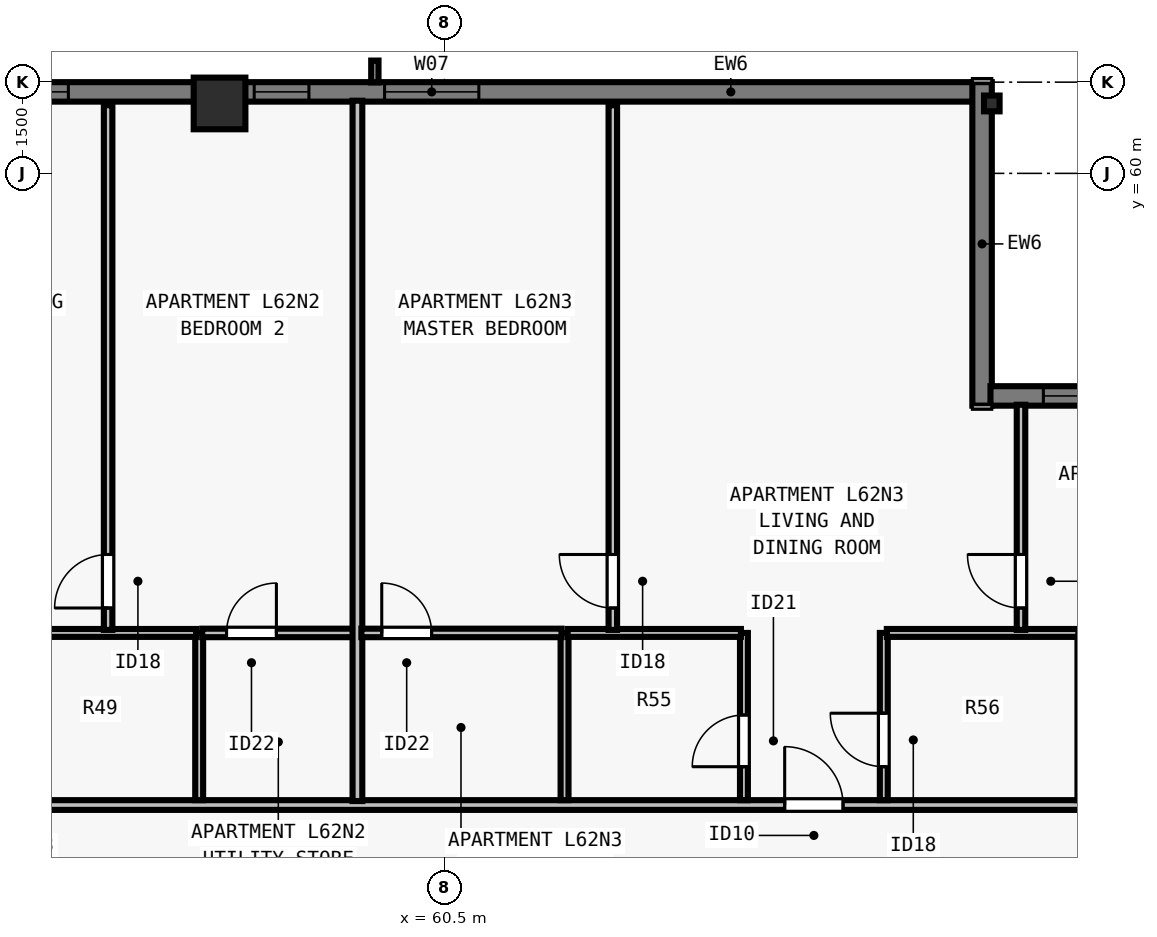
"""IFC4 building model, lengths in metres.
Left out: names, types, materials, properties, quantities, classifications, styles, units other than length and angle.
Written with IfcOpenShell. Run it as: python <this file> out.ifc"""

import sys

from ifc_helpers import new_model, si_unit, direction, frame, frame_2d, origin, origin_2d, place, context, subcontext, project, spatial, rectangle, i_section, extrude, element, fill, save


model = new_model("IFC4")
c1 = context("Model", 3, precision=1e-05, world=origin(), true_north=direction((0.0, 1.0)))
c2 = subcontext(c1, "Body", "Model", "MODEL_VIEW")
j1 = project(units=[si_unit("LENGTHUNIT", "METRE"), si_unit("PLANEANGLEUNIT", "RADIAN")], contexts=[c1])
p1 = place(None, origin())
s1 = spatial("IfcSite", under=j1, at=p1, CompositionType="ELEMENT")
p2 = place(p1, origin())
s2 = spatial("IfcBuilding", under=s1, at=p2, CompositionType="ELEMENT")
p3 = place(p2, frame((0.0, 0.0, 227.0)))
s3 = spatial("IfcBuildingStorey", under=s2, at=p3, CompositionType="ELEMENT", Elevation=227.0)
p4 = place(p3, frame((69.5, 61.15, 0.0), z_axis=(0.0, 0.0, 1.0), x_axis=(1.0, 0.0, 0.0)))
e1 = element("IfcColumn", 1, at=p4, inside=s3, PredefinedType="COLUMN", context=c2, shape_type="SweptSolid", body=[
    extrude(i_section(OverallWidth=0.256, OverallDepth=0.26, WebThickness=0.01, FlangeThickness=0.017, FilletRadius=0.013, at=origin_2d()), origin(), (0.0, 0.0, 1.0), 3.5),
])
p5 = place(p3, frame((56.8, 61.15, 0.0), z_axis=(0.0, 0.0, 1.0), x_axis=(1.0, 0.0, 0.0)))
e2 = element("IfcColumn", 2, at=p5, inside=s3, PredefinedType="COLUMN", context=c2, shape_type="SweptSolid", body=[
    extrude(rectangle(XDim=0.85, YDim=0.85, at=origin_2d()), origin(), (0.0, 0.0, 1.0), 3.5),
])
p6 = place(p3, frame((34.5, 61.34, 0.0), z_axis=(0.0, 0.0, 1.0), x_axis=(1.0, 0.0, 0.0)))
e3 = element("IfcWall", 3, at=p6, inside=s3, PredefinedType="SOLIDWALL", context=c2, shape_type="SweptSolid", body=[
    extrude(rectangle(XDim=34.702, YDim=0.32, at=frame_2d((17.351, 0.0))), origin(), (0.0, 0.0, 1.0), 3.29),
])
p7 = place(p6, frame((4.312, 0.0, 0.8)))
e4 = element("IfcOpeningElement", 4, at=p7, cuts=e3, PredefinedType="OPENING", context=c2, shape_type="SweptSolid", body=[
    extrude(rectangle(XDim=1.55, YDim=1.678, at=frame_2d((0.775, 0.839))), frame((0.0, 0.17, 0.0), z_axis=(0.0, -1.0, 0.0), x_axis=(1.0, 0.0, 0.0)), (0.0, 0.0, 1.0), 0.34),
])
p8 = place(p6, frame((7.988, 0.0, 0.8)))
e5 = element("IfcOpeningElement", 5, at=p8, cuts=e3, PredefinedType="OPENING", context=c2, shape_type="SweptSolid", body=[
    extrude(rectangle(XDim=1.85, YDim=1.678, at=frame_2d((0.925, 0.839))), frame((0.0, 0.17, 0.0), z_axis=(0.0, -1.0, 0.0), x_axis=(1.0, 0.0, 0.0)), (0.0, 0.0, 1.0), 0.34),
])
p9 = place(p6, frame((15.188, 0.0, 0.8)))
e6 = element("IfcOpeningElement", 6, at=p9, cuts=e3, PredefinedType="OPENING", context=c2, shape_type="SweptSolid", body=[
    extrude(rectangle(XDim=1.85, YDim=1.678, at=frame_2d((0.925, 0.839))), frame((0.0, 0.17, 0.0), z_axis=(0.0, -1.0, 0.0), x_axis=(1.0, 0.0, 0.0)), (0.0, 0.0, 1.0), 0.34),
])
p10 = place(p6, frame((18.264, 0.0, 0.8)))
e7 = element("IfcOpeningElement", 7, at=p10, cuts=e3, PredefinedType="OPENING", context=c2, shape_type="SweptSolid", body=[
    extrude(rectangle(XDim=1.55, YDim=1.678, at=frame_2d((0.775, 0.839))), frame((0.0, 0.17, 0.0), z_axis=(0.0, -1.0, 0.0), x_axis=(1.0, 0.0, 0.0)), (0.0, 0.0, 1.0), 0.34),
])
p11 = place(p6, frame((25.014, 0.0, 0.8)))
e8 = element("IfcOpeningElement", 8, at=p11, cuts=e3, PredefinedType="OPENING", context=c2, shape_type="SweptSolid", body=[
    extrude(rectangle(XDim=1.55, YDim=1.678, at=frame_2d((0.775, 0.839))), frame((0.0, 0.17, 0.0), z_axis=(0.0, -1.0, 0.0), x_axis=(1.0, 0.0, 0.0)), (0.0, 0.0, 1.0), 0.34),
])
p12 = place(p6, frame((10.95, 0.0, 0.8)))
e9 = element("IfcOpeningElement", 9, at=p12, cuts=e3, PredefinedType="OPENING", context=c2, shape_type="SweptSolid", body=[
    extrude(rectangle(XDim=0.9, YDim=1.678, at=frame_2d((0.45, 0.839))), frame((0.0, 0.17, 0.0), z_axis=(0.0, -1.0, 0.0), x_axis=(1.0, 0.0, 0.0)), (0.0, 0.0, 1.0), 0.34),
])
p13 = place(p6, frame((22.87, 0.0, 0.8)))
e10 = element("IfcOpeningElement", 10, at=p13, cuts=e3, PredefinedType="OPENING", context=c2, shape_type="SweptSolid", body=[
    extrude(rectangle(XDim=0.9, YDim=1.678, at=frame_2d((0.45, 0.839))), frame((0.0, 0.17, 0.0), z_axis=(0.0, -1.0, 0.0), x_axis=(1.0, 0.0, 0.0)), (0.0, 0.0, 1.0), 0.34),
])
p14 = place(p3, frame((69.34, 61.5, 0.0), z_axis=(0.0, 0.0, 1.0), x_axis=(0.0, -1.0, 0.0)))
e11 = element("IfcWall", 11, at=p14, inside=s3, PredefinedType="SOLIDWALL", context=c2, shape_type="SweptSolid", body=[
    extrude(rectangle(XDim=5.32, YDim=0.32, at=frame_2d((2.66, 0.0))), origin(), (0.0, 0.0, 1.0), 3.29),
])
p15 = place(p3, frame((69.478, 56.34, 0.0), z_axis=(0.0, 0.0, 1.0), x_axis=(1.0, 0.0, 0.0)))
e12 = element("IfcWall", 12, at=p15, inside=s3, PredefinedType="SOLIDWALL", context=c2, shape_type="SweptSolid", body=[
    extrude(rectangle(XDim=4.724, YDim=0.32, at=frame_2d((2.362, 0.0))), origin(), (0.0, 0.0, 1.0), 3.29),
])
p16 = place(p15, frame((0.87, 0.0, 0.8)))
e13 = element("IfcOpeningElement", 13, at=p16, cuts=e12, PredefinedType="OPENING", context=c2, shape_type="SweptSolid", body=[
    extrude(rectangle(XDim=0.9, YDim=1.678, at=frame_2d((0.45, 0.839))), frame((0.0, 0.17, 0.0), z_axis=(0.0, -1.0, 0.0), x_axis=(1.0, 0.0, 0.0)), (0.0, 0.0, 1.0), 0.34),
])
p17 = place(p3, frame((29.77, 49.613, 0.0), z_axis=(0.0, 0.0, 1.0), x_axis=(1.0, 0.0, 0.0)))
e14 = element("IfcWall", 14, at=p17, inside=s3, PredefinedType="PARTITIONING", context=c2, shape_type="SweptSolid", body=[
    extrude(rectangle(XDim=44.425, YDim=0.16, at=frame_2d((22.212, 0.0))), origin(), (0.0, 0.0, 1.0), 2.958),
])
p18 = place(p17, frame((7.241, 0.0, 0.0)))
e15 = element("IfcOpeningElement", 15, at=p18, cuts=e14, PredefinedType="OPENING", context=c2, shape_type="SweptSolid", body=[
    extrude(rectangle(XDim=0.96, YDim=2.18, at=frame_2d((0.48, 1.09))), frame((0.0, 0.09, 0.0), z_axis=(0.0, -1.0, 0.0), x_axis=(1.0, 0.0, 0.0)), (0.0, 0.0, 1.0), 0.18),
])
p19 = place(p17, frame((21.815, 0.0, 0.0)))
e16 = element("IfcOpeningElement", 16, at=p19, cuts=e14, PredefinedType="OPENING", context=c2, shape_type="SweptSolid", body=[
    extrude(rectangle(XDim=0.96, YDim=2.18, at=frame_2d((0.48, 1.09))), frame((0.0, 0.09, 0.0), z_axis=(0.0, -1.0, 0.0), x_axis=(1.0, 0.0, 0.0)), (0.0, 0.0, 1.0), 0.18),
])
p20 = place(p17, frame((36.324, 0.0, 0.0)))
e17 = element("IfcOpeningElement", 17, at=p20, cuts=e14, PredefinedType="OPENING", context=c2, shape_type="SweptSolid", body=[
    extrude(rectangle(XDim=0.96, YDim=2.18, at=frame_2d((0.48, 1.09))), frame((0.0, 0.09, 0.0), z_axis=(0.0, -1.0, 0.0), x_axis=(1.0, 0.0, 0.0)), (0.0, 0.0, 1.0), 0.18),
])
p21 = place(p3, frame((56.465, 49.692, 0.0), z_axis=(0.0, 0.0, 1.0), x_axis=(0.0, 1.0, 0.0)))
e18 = element("IfcWall", 18, at=p21, inside=s3, PredefinedType="PLUMBINGWALL", context=c2, shape_type="SweptSolid", body=[
    extrude(rectangle(XDim=2.75, YDim=0.13, at=frame_2d((1.375, 0.0))), origin(), (0.0, 0.0, 1.0), 3.29),
])
p22 = place(p3, frame((53.265, 52.442, 0.0), z_axis=(0.0, 0.0, 1.0), x_axis=(1.0, 0.0, 0.0)))
e19 = element("IfcWall", 19, at=p22, inside=s3, PredefinedType="PLUMBINGWALL", context=c2, shape_type="SweptSolid", body=[
    extrude(rectangle(XDim=3.15, YDim=0.13, at=frame_2d((1.575, 0.0))), origin(), (0.0, 0.0, 1.0), 3.29),
])
p23 = place(p3, frame((54.968, 52.492, 0.0), z_axis=(0.0, 0.0, 1.0), x_axis=(0.0, 1.0, 0.0)))
e20 = element("IfcWall", 20, at=p23, inside=s3, PredefinedType="PARTITIONING", context=c2, shape_type="SweptSolid", body=[
    extrude(rectangle(XDim=8.628, YDim=0.14, at=frame_2d((4.314, 0.0))), origin(), (0.0, 0.0, 1.0), 2.958),
])
p24 = place(p23, frame((0.36, 0.0, 0.0)))
e21 = element("IfcOpeningElement", 21, at=p24, cuts=e20, PredefinedType="OPENING", context=c2, shape_type="SweptSolid", body=[
    extrude(rectangle(XDim=0.88, YDim=2.1, at=frame_2d((0.44, 1.05))), frame((0.0, 0.08, 0.0), z_axis=(0.0, -1.0, 0.0), x_axis=(1.0, 0.0, 0.0)), (0.0, 0.0, 1.0), 0.16),
])
p25 = place(p3, frame((56.515, 52.442, 0.0), z_axis=(0.0, 0.0, 1.0), x_axis=(1.0, 0.0, 0.0)))
e22 = element("IfcWall", 22, at=p25, inside=s3, PredefinedType="PARTITIONING", context=c2, shape_type="SweptSolid", body=[
    extrude(rectangle(XDim=2.603, YDim=0.14, at=frame_2d((1.301, 0.0))), origin(), (0.0, 0.0, 1.0), 3.29),
])
p26 = place(p25, frame((0.4, 0.0, 0.0)))
e23 = element("IfcOpeningElement", 23, at=p26, cuts=e22, PredefinedType="OPENING", context=c2, shape_type="SweptSolid", body=[
    extrude(rectangle(XDim=0.82, YDim=2.1, at=frame_2d((0.41, 1.05))), frame((0.0, 0.08, 0.0), z_axis=(0.0, -1.0, 0.0), x_axis=(1.0, 0.0, 0.0)), (0.0, 0.0, 1.0), 0.16),
])
p27 = place(p3, frame((59.067, 49.677, 0.0), z_axis=(0.0, 0.0, 1.0), x_axis=(0.0, 1.0, 0.0)))
e24 = element("IfcWall", 24, at=p27, inside=s3, PredefinedType="PARTITIONING", context=c2, shape_type="SweptSolid", body=[
    extrude(rectangle(XDim=11.518, YDim=0.16, at=frame_2d((5.759, 0.0))), origin(), (0.0, 0.0, 1.0), 3.29),
])
p28 = place(p3, frame((62.474, 49.692, 0.0), z_axis=(0.0, 0.0, 1.0), x_axis=(0.0, 1.0, 0.0)))
e25 = element("IfcWall", 25, at=p28, inside=s3, PredefinedType="PLUMBINGWALL", context=c2, shape_type="SweptSolid", body=[
    extrude(rectangle(XDim=2.75, YDim=0.13, at=frame_2d((1.375, 0.0))), origin(), (0.0, 0.0, 1.0), 2.573),
])
p29 = place(p3, frame((65.424, 49.692, 0.0), z_axis=(0.0, 0.0, 1.0), x_axis=(0.0, 1.0, 0.0)))
e26 = element("IfcWall", 26, at=p29, inside=s3, PredefinedType="PLUMBINGWALL", context=c2, shape_type="SweptSolid", body=[
    extrude(rectangle(XDim=2.75, YDim=0.13, at=frame_2d((1.375, 0.0))), origin(), (0.0, 0.0, 1.0), 3.29),
])
p30 = place(p29, frame((0.55, 0.0, 0.0)))
e27 = element("IfcOpeningElement", 27, at=p30, cuts=e26, PredefinedType="OPENING", context=c2, shape_type="SweptSolid", body=[
    extrude(rectangle(XDim=0.85, YDim=2.08, at=frame_2d((0.425, 1.04))), frame((0.0, 0.075, 0.0), z_axis=(0.0, -1.0, 0.0), x_axis=(1.0, 0.0, 0.0)), (0.0, 0.0, 1.0), 0.15),
])
p31 = place(p3, frame((62.524, 52.442, 0.0), z_axis=(0.0, 0.0, 1.0), x_axis=(1.0, 0.0, 0.0)))
e28 = element("IfcWall", 28, at=p31, inside=s3, PredefinedType="PLUMBINGWALL", context=c2, shape_type="SweptSolid", body=[
    extrude(rectangle(XDim=2.85, YDim=0.13, at=frame_2d((1.425, 0.0))), origin(), (0.0, 0.0, 1.0), 3.29),
])
p32 = place(p3, frame((67.724, 49.692, 0.0), z_axis=(0.0, 0.0, 1.0), x_axis=(0.0, 1.0, 0.0)))
e29 = element("IfcWall", 29, at=p32, inside=s3, PredefinedType="PLUMBINGWALL", context=c2, shape_type="SweptSolid", body=[
    extrude(rectangle(XDim=2.75, YDim=0.13, at=frame_2d((1.375, 0.0))), origin(), (0.0, 0.0, 1.0), 3.29),
])
p33 = place(p32, frame((0.55, 0.0, 0.0)))
e30 = element("IfcOpeningElement", 30, at=p33, cuts=e29, PredefinedType="OPENING", context=c2, shape_type="SweptSolid", body=[
    extrude(rectangle(XDim=0.88, YDim=2.1, at=frame_2d((0.44, 1.05))), frame((0.0, 0.075, 0.0), z_axis=(0.0, -1.0, 0.0), x_axis=(1.0, 0.0, 0.0)), (0.0, 0.0, 1.0), 0.15),
])
p34 = place(p3, frame((67.774, 52.442, 0.0), z_axis=(0.0, 0.0, 1.0), x_axis=(1.0, 0.0, 0.0)))
e31 = element("IfcWall", 31, at=p34, inside=s3, PredefinedType="PLUMBINGWALL", context=c2, shape_type="SweptSolid", body=[
    extrude(rectangle(XDim=3.15, YDim=0.13, at=frame_2d((1.575, 0.0))), origin(), (0.0, 0.0, 1.0), 2.958),
])
p35 = place(p3, frame((63.268, 52.492, 0.0), z_axis=(0.0, 0.0, 1.0), x_axis=(0.0, 1.0, 0.0)))
e32 = element("IfcWall", 32, at=p35, inside=s3, PredefinedType="PARTITIONING", context=c2, shape_type="SweptSolid", body=[
    extrude(rectangle(XDim=8.628, YDim=0.14, at=frame_2d((4.314, 0.0))), origin(), (0.0, 0.0, 1.0), 3.29),
])
p36 = place(p35, frame((0.36, 0.0, 0.0)))
e33 = element("IfcOpeningElement", 33, at=p36, cuts=e32, PredefinedType="OPENING", context=c2, shape_type="SweptSolid", body=[
    extrude(rectangle(XDim=0.88, YDim=2.1, at=frame_2d((0.44, 1.05))), frame((0.0, 0.08, 0.0), z_axis=(0.0, -1.0, 0.0), x_axis=(1.0, 0.0, 0.0)), (0.0, 0.0, 1.0), 0.16),
])
p37 = place(p3, frame((59.133, 52.442, 0.0), z_axis=(0.0, 0.0, 1.0), x_axis=(1.0, 0.0, 0.0)))
e34 = element("IfcWall", 34, at=p37, inside=s3, PredefinedType="PARTITIONING", context=c2, shape_type="SweptSolid", body=[
    extrude(rectangle(XDim=3.291, YDim=0.14, at=frame_2d((1.646, 0.0))), origin(), (0.0, 0.0, 1.0), 3.29),
])
p38 = place(p37, frame((0.335, 0.0, 0.0)))
e35 = element("IfcOpeningElement", 35, at=p38, cuts=e34, PredefinedType="OPENING", context=c2, shape_type="SweptSolid", body=[
    extrude(rectangle(XDim=0.82, YDim=2.1, at=frame_2d((0.41, 1.05))), frame((0.0, 0.08, 0.0), z_axis=(0.0, -1.0, 0.0), x_axis=(1.0, 0.0, 0.0)), (0.0, 0.0, 1.0), 0.16),
])
p39 = place(p3, frame((69.98, 52.492, 0.0), z_axis=(0.0, 0.0, 1.0), x_axis=(0.0, 1.0, 0.0)))
e36 = element("IfcWall", 36, at=p39, inside=s3, PredefinedType="PARTITIONING", context=c2, shape_type="SweptSolid", body=[
    extrude(rectangle(XDim=3.703, YDim=0.14, at=frame_2d((1.851, 0.0))), origin(), (0.0, 0.0, 1.0), 3.29),
])
p40 = place(p39, frame((0.36, 0.0, 0.0)))
e37 = element("IfcOpeningElement", 37, at=p40, cuts=e36, PredefinedType="OPENING", context=c2, shape_type="SweptSolid", body=[
    extrude(rectangle(XDim=0.88, YDim=2.1, at=frame_2d((0.44, 1.05))), frame((0.0, 0.08, 0.0), z_axis=(0.0, -1.0, 0.0), x_axis=(1.0, 0.0, 0.0)), (0.0, 0.0, 1.0), 0.16),
])
p41 = place(p10, origin())
e38 = element("IfcWindow", 38, at=p41, inside=s3, PartitioningType="SINGLE_PANEL", PredefinedType="WINDOW", context=c2, shape_type="SweptSolid", body=[
    extrude(rectangle(XDim=1.55, YDim=1.678, at=frame_2d((0.775, 0.839))), frame((0.0, -0.05, 0.0), z_axis=(0.0, -1.0, 0.0), x_axis=(1.0, 0.0, 0.0)), (0.0, 0.0, 1.0), 0.06),
])
fill(e7, e38)
p42 = place(p11, origin())
e39 = element("IfcWindow", 39, at=p42, inside=s3, PartitioningType="SINGLE_PANEL", PredefinedType="WINDOW", context=c2, shape_type="SweptSolid", body=[
    extrude(rectangle(XDim=1.55, YDim=1.678, at=frame_2d((0.775, 0.839))), frame((0.0, -0.05, 0.0), z_axis=(0.0, -1.0, 0.0), x_axis=(1.0, 0.0, 0.0)), (0.0, 0.0, 1.0), 0.06),
])
fill(e8, e39)
p43 = place(p13, origin())
e40 = element("IfcWindow", 40, at=p43, inside=s3, PartitioningType="SINGLE_PANEL", PredefinedType="WINDOW", context=c2, shape_type="SweptSolid", body=[
    extrude(rectangle(XDim=0.9, YDim=1.678, at=frame_2d((0.45, 0.839))), frame((0.0, -0.04, 0.0), z_axis=(0.0, -1.0, 0.0), x_axis=(1.0, 0.0, 0.0)), (0.0, 0.0, 1.0), 0.06),
])
fill(e10, e40)
p44 = place(p16, origin())
e41 = element("IfcWindow", 41, at=p44, inside=s3, PartitioningType="SINGLE_PANEL", PredefinedType="WINDOW", context=c2, shape_type="SweptSolid", body=[
    extrude(rectangle(XDim=0.9, YDim=1.678, at=frame_2d((0.45, 0.839))), frame((0.0, -0.04, 0.0), z_axis=(0.0, -1.0, 0.0), x_axis=(1.0, 0.0, 0.0)), (0.0, 0.0, 1.0), 0.06),
])
fill(e13, e41)
p45 = place(p26, origin())
e42 = element("IfcDoor", 42, at=p45, inside=s3, OperationType="SINGLE_SWING_RIGHT", PredefinedType="DOOR", context=c2, shape_type="SweptSolid", body=[
    extrude(rectangle(XDim=0.82, YDim=2.1, at=frame_2d((0.41, 1.05))), frame((0.0, 0.025, 0.0), z_axis=(0.0, -1.0, 0.0), x_axis=(1.0, 0.0, 0.0)), (0.0, 0.0, 1.0), 0.05),
])
fill(e23, e42)
p46 = place(p24, origin())
e43 = element("IfcDoor", 43, at=p46, inside=s3, OperationType="SINGLE_SWING_LEFT", PredefinedType="DOOR", context=c2, shape_type="SweptSolid", body=[
    extrude(rectangle(XDim=0.88, YDim=2.1, at=frame_2d((0.44, 1.05))), frame((0.0, 0.025, 0.0), z_axis=(0.0, -1.0, 0.0), x_axis=(1.0, 0.0, 0.0)), (0.0, 0.0, 1.0), 0.05),
])
fill(e21, e43)
p47 = place(p30, origin())
e44 = element("IfcDoor", 44, at=p47, inside=s3, OperationType="SINGLE_SWING_LEFT", PredefinedType="DOOR", context=c2, shape_type="SweptSolid", body=[
    extrude(rectangle(XDim=0.85, YDim=2.08, at=frame_2d((0.425, 1.04))), frame((0.0, 0.025, 0.0), z_axis=(0.0, -1.0, 0.0), x_axis=(1.0, 0.0, 0.0)), (0.0, 0.0, 1.0), 0.05),
])
fill(e27, e44)
p48 = place(p33, origin())
e45 = element("IfcDoor", 45, at=p48, inside=s3, OperationType="SINGLE_SWING_RIGHT", PredefinedType="DOOR", context=c2, shape_type="SweptSolid", body=[
    extrude(rectangle(XDim=0.88, YDim=2.1, at=frame_2d((0.44, 1.05))), frame((0.0, 0.025, 0.0), z_axis=(0.0, -1.0, 0.0), x_axis=(1.0, 0.0, 0.0)), (0.0, 0.0, 1.0), 0.05),
])
fill(e30, e45)
p49 = place(p38, origin())
e46 = element("IfcDoor", 46, at=p49, inside=s3, OperationType="SINGLE_SWING_LEFT", PredefinedType="DOOR", context=c2, shape_type="SweptSolid", body=[
    extrude(rectangle(XDim=0.82, YDim=2.1, at=frame_2d((0.41, 1.05))), frame((0.0, 0.025, 0.0), z_axis=(0.0, -1.0, 0.0), x_axis=(1.0, 0.0, 0.0)), (0.0, 0.0, 1.0), 0.05),
])
fill(e35, e46)
p50 = place(p36, origin())
e47 = element("IfcDoor", 47, at=p50, inside=s3, OperationType="SINGLE_SWING_RIGHT", PredefinedType="DOOR", context=c2, shape_type="SweptSolid", body=[
    extrude(rectangle(XDim=0.88, YDim=2.1, at=frame_2d((0.44, 1.05))), frame((0.0, 0.025, 0.0), z_axis=(0.0, -1.0, 0.0), x_axis=(1.0, 0.0, 0.0)), (0.0, 0.0, 1.0), 0.05),
])
fill(e33, e47)
p51 = place(p40, origin())
e48 = element("IfcDoor", 48, at=p51, inside=s3, OperationType="SINGLE_SWING_RIGHT", PredefinedType="DOOR", context=c2, shape_type="SweptSolid", body=[
    extrude(rectangle(XDim=0.88, YDim=2.1, at=frame_2d((0.44, 1.05))), frame((0.0, 0.025, 0.0), z_axis=(0.0, -1.0, 0.0), x_axis=(1.0, 0.0, 0.0)), (0.0, 0.0, 1.0), 0.05),
])
fill(e37, e48)
p52 = place(p20, origin())
e49 = element("IfcDoor", 49, at=p52, inside=s3, OperationType="SINGLE_SWING_LEFT", PredefinedType="DOOR", context=c2, shape_type="SweptSolid", body=[
    extrude(rectangle(XDim=0.96, YDim=2.18, at=frame_2d((0.48, 1.09))), frame((0.0, 0.025, 0.0), z_axis=(0.0, -1.0, 0.0), x_axis=(1.0, 0.0, 0.0)), (0.0, 0.0, 1.0), 0.05),
])
fill(e17, e49)
save(model, sys.argv[1])
